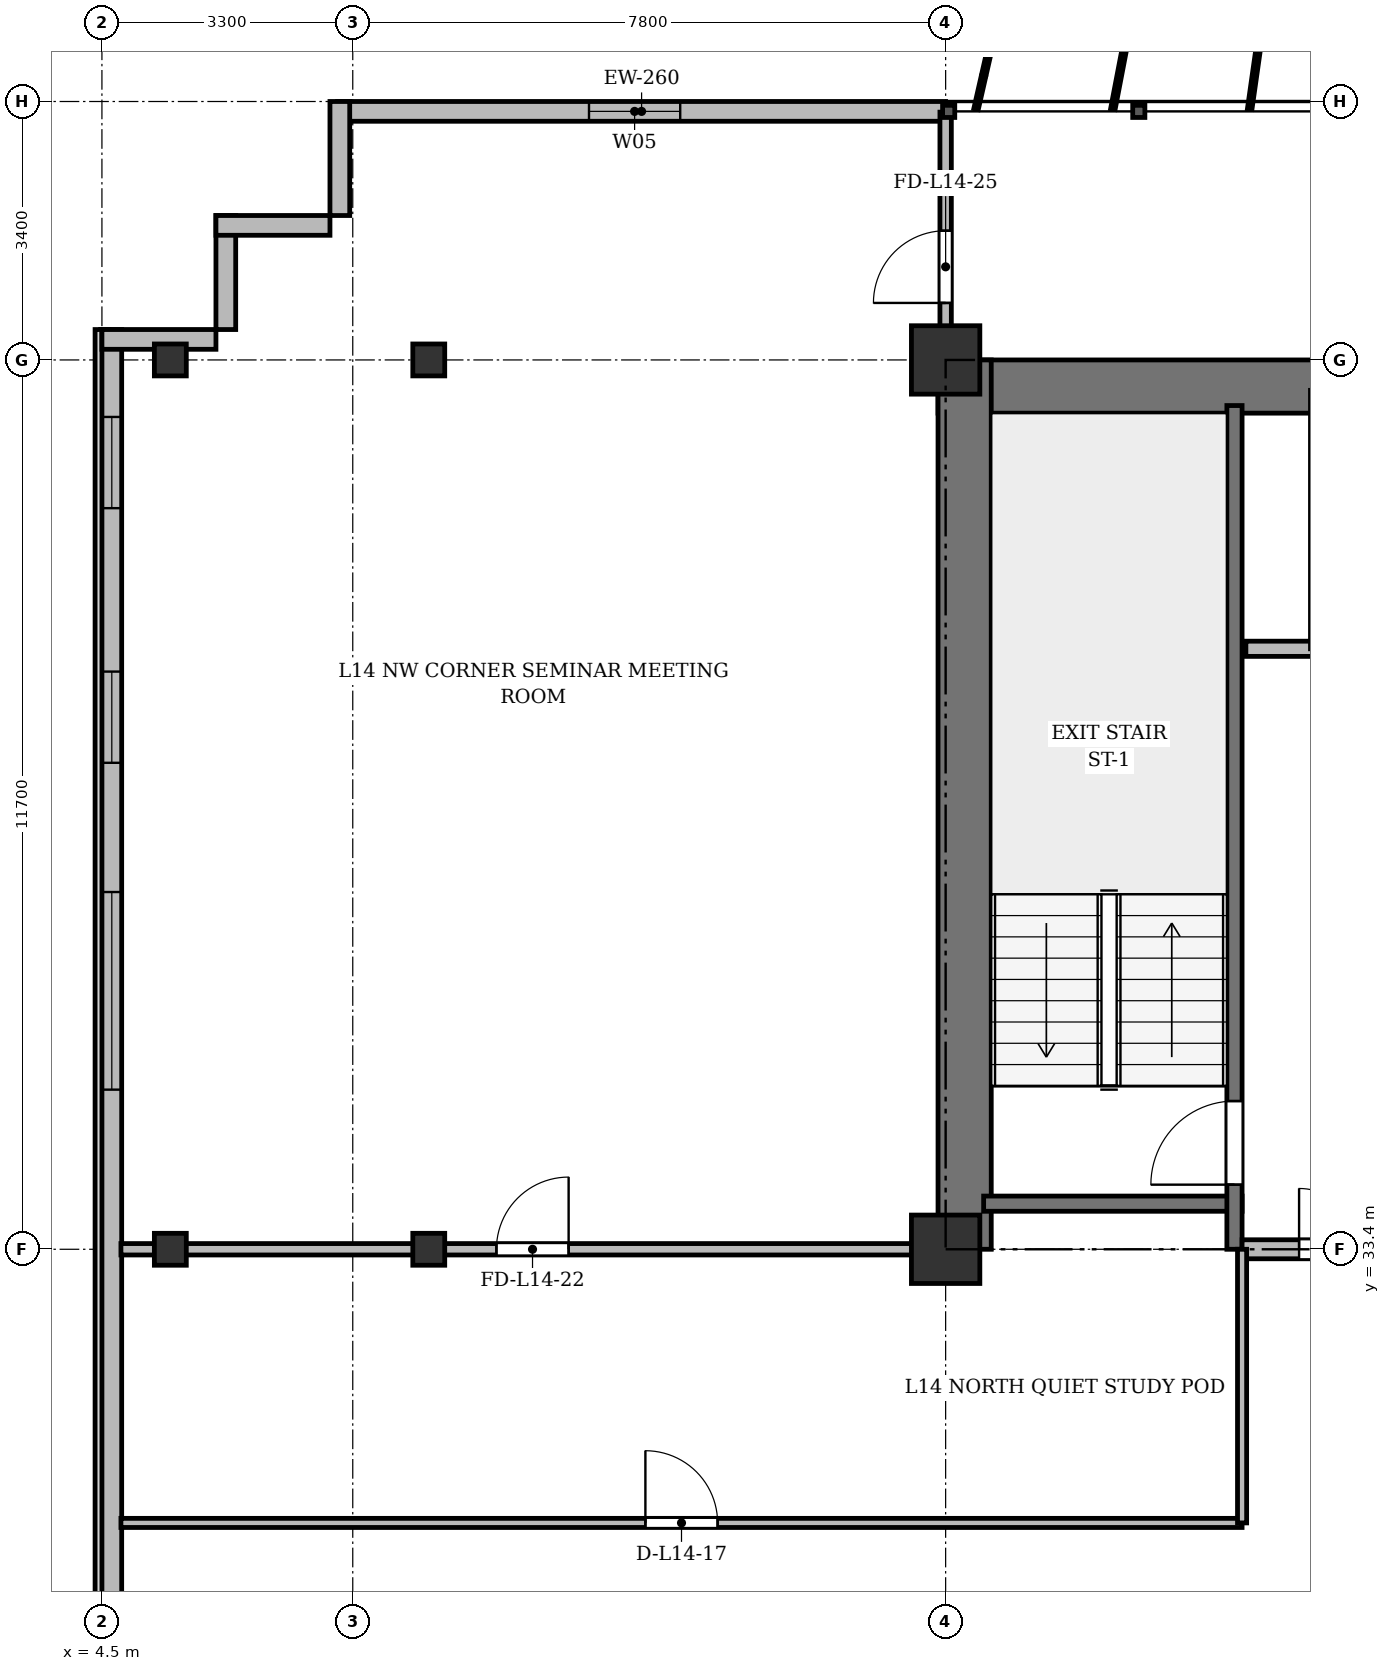
"""IFC4 building model, lengths in metres.
Left out: names, types, materials, properties, quantities, classifications, styles, units other than length and angle.
Written with IfcOpenShell. Run it as: python <this file> out.ifc"""

import sys

from ifc_helpers import new_model, si_unit, direction, frame, frame_2d, origin, origin_2d, place, context, subcontext, project, spatial, rectangle, i_section, extrude, source, transform, mapped, element, fill, save


model = new_model("IFC4")
c1 = context("Model", 3, precision=1e-05, world=origin(), true_north=direction((0.0, 1.0)))
c2 = subcontext(c1, "Body", "Model", "MODEL_VIEW")
j1 = project(units=[si_unit("LENGTHUNIT", "METRE"), si_unit("PLANEANGLEUNIT", "RADIAN")], contexts=[c1])
p1 = place(None, origin())
s1 = spatial("IfcSite", under=j1, at=p1, CompositionType="ELEMENT")
p2 = place(p1, origin())
s2 = spatial("IfcBuilding", under=s1, at=p2, CompositionType="ELEMENT")
p3 = place(p2, frame((0.0, 0.0, 55.9)))
s3 = spatial("IfcBuildingStorey", under=s2, at=p3, CompositionType="ELEMENT", Elevation=55.9)
m1 = source(origin(), c2, "Body", "SweptSolid", [
    extrude(i_section(OverallWidth=0.42, OverallDepth=0.42, WebThickness=0.026, FlangeThickness=0.04, at=origin_2d()), origin(), (0.0, 0.0, 1.0), 3.6),
])
for number, where, z_axis, x_axis in (
    (1, (5.4, 33.4, 0.0), (0.0, 0.0, 1.0), (1.0, 0.0, 0.0)),
    (2, (5.4, 45.1, 0.0), (0.0, 0.0, 1.0), (1.0, 0.0, 0.0)),
    (3, (8.8, 33.4, 0.0), (0.0, 0.0, 1.0), (1.0, 0.0, 0.0)),
    (4, (8.8, 45.1, 0.0), (0.0, 0.0, 1.0), (1.0, 0.0, 0.0)),
):
    element("IfcColumn", number, at=place(p3, frame(where, z_axis=z_axis, x_axis=x_axis)), inside=s3, PredefinedType="COLUMN", context=c2, shape_type="MappedRepresentation", body=[
        mapped(m1, transform((0.0, 0.0, 0.0), x_axis=(1.0, 0.0, 0.0), y_axis=(0.0, 1.0, 0.0), z_axis=(0.0, 0.0, 1.0), scale=1.0)),
    ])
m2 = source(origin(), c2, "Body", "SweptSolid", [
    extrude(rectangle(XDim=0.9, YDim=0.9, at=origin_2d()), origin(), (0.0, 0.0, 1.0), 3.6),
])
for number, where, z_axis, x_axis in (
    (5, (15.6, 33.4, 0.0), (0.0, 0.0, 1.0), (1.0, 0.0, 0.0)),
    (6, (15.6, 45.1, 0.0), (0.0, 0.0, 1.0), (1.0, 0.0, 0.0)),
):
    element("IfcColumn", number, at=place(p3, frame(where, z_axis=z_axis, x_axis=x_axis)), inside=s3, PredefinedType="COLUMN", context=c2, shape_type="MappedRepresentation", body=[
        mapped(m2, transform((0.0, 0.0, 0.0), x_axis=(1.0, 0.0, 0.0), y_axis=(0.0, 1.0, 0.0), z_axis=(0.0, 0.0, 1.0), scale=1.0)),
    ])
p4 = place(p3, frame((7.6, 48.37, 0.0), z_axis=(0.0, 0.0, 1.0), x_axis=(1.0, 0.0, 0.0)))
e7 = element("IfcWall", 7, at=p4, inside=s3, PredefinedType="SOLIDWALL", context=c2, shape_type="SweptSolid", body=[
    extrude(rectangle(XDim=8.0, YDim=0.26, at=frame_2d((4.0, 0.0))), origin(), (0.0, 0.0, 1.0), 3.34),
])
p5 = place(p4, frame((3.308, 0.0, 0.9)))
e8 = element("IfcOpeningElement", 8, at=p5, cuts=e7, PredefinedType="OPENING", context=c2, shape_type="SweptSolid", body=[
    extrude(rectangle(XDim=1.2, YDim=1.65, at=frame_2d((0.6, 0.825))), frame((0.0, 0.14, 0.0), z_axis=(0.0, -1.0, 0.0), x_axis=(1.0, 0.0, 0.0)), (0.0, 0.0, 1.0), 0.28),
])
p6 = place(p3, frame((4.63, 5.9, 0.0), z_axis=(0.0, 0.0, 1.0), x_axis=(0.0, 1.0, 0.0)))
e9 = element("IfcWall", 9, at=p6, inside=s3, PredefinedType="SOLIDWALL", context=c2, shape_type="SweptSolid", body=[
    extrude(rectangle(XDim=39.6, YDim=0.26, at=frame_2d((19.8, 0.0))), origin(), (0.0, 0.0, 1.0), 3.34),
])
p7 = place(p6, frame((1.45, 0.0, 0.92)))
e10 = element("IfcOpeningElement", 10, at=p7, cuts=e9, PredefinedType="OPENING", context=c2, shape_type="SweptSolid", body=[
    extrude(rectangle(XDim=1.2, YDim=1.65, at=frame_2d((0.6, 0.825))), frame((0.0, 0.14, 0.0), z_axis=(0.0, -1.0, 0.0), x_axis=(1.0, 0.0, 0.0)), (0.0, 0.0, 1.0), 0.28),
])
p8 = place(p6, frame((4.2, 0.0, 0.92)))
e11 = element("IfcOpeningElement", 11, at=p8, cuts=e9, PredefinedType="OPENING", context=c2, shape_type="SweptSolid", body=[
    extrude(rectangle(XDim=2.6, YDim=1.9, at=frame_2d((1.3, 0.95))), frame((0.0, 0.14, 0.0), z_axis=(0.0, -1.0, 0.0), x_axis=(1.0, 0.0, 0.0)), (0.0, 0.0, 1.0), 0.28),
])
p9 = place(p6, frame((8.4, 0.0, 0.92)))
e12 = element("IfcOpeningElement", 12, at=p9, cuts=e9, PredefinedType="OPENING", context=c2, shape_type="SweptSolid", body=[
    extrude(rectangle(XDim=2.6, YDim=1.9, at=frame_2d((1.3, 0.95))), frame((0.0, 0.14, 0.0), z_axis=(0.0, -1.0, 0.0), x_axis=(1.0, 0.0, 0.0)), (0.0, 0.0, 1.0), 0.28),
])
p10 = place(p6, frame((29.6, 0.0, 0.92)))
e13 = element("IfcOpeningElement", 13, at=p10, cuts=e9, PredefinedType="OPENING", context=c2, shape_type="SweptSolid", body=[
    extrude(rectangle(XDim=2.6, YDim=1.9, at=frame_2d((1.3, 0.95))), frame((0.0, 0.14, 0.0), z_axis=(0.0, -1.0, 0.0), x_axis=(1.0, 0.0, 0.0)), (0.0, 0.0, 1.0), 0.28),
])
p11 = place(p6, frame((33.9, 0.0, 0.92)))
e14 = element("IfcOpeningElement", 14, at=p11, cuts=e9, PredefinedType="OPENING", context=c2, shape_type="SweptSolid", body=[
    extrude(rectangle(XDim=1.2, YDim=1.65, at=frame_2d((0.6, 0.825))), frame((0.0, 0.14, 0.0), z_axis=(0.0, -1.0, 0.0), x_axis=(1.0, 0.0, 0.0)), (0.0, 0.0, 1.0), 0.28),
])
p12 = place(p6, frame((37.25, 0.0, 0.92)))
e15 = element("IfcOpeningElement", 15, at=p12, cuts=e9, PredefinedType="OPENING", context=c2, shape_type="SweptSolid", body=[
    extrude(rectangle(XDim=1.2, YDim=1.65, at=frame_2d((0.6, 0.825))), frame((0.0, 0.14, 0.0), z_axis=(0.0, -1.0, 0.0), x_axis=(1.0, 0.0, 0.0)), (0.0, 0.0, 1.0), 0.28),
])
p13 = place(p3, frame((4.5, 45.37, 0.0), z_axis=(0.0, 0.0, 1.0), x_axis=(1.0, 0.0, 0.0)))
e16 = element("IfcWall", 16, at=p13, inside=s3, PredefinedType="SOLIDWALL", context=c2, shape_type="SweptSolid", body=[
    extrude(rectangle(XDim=1.5, YDim=0.26, at=frame_2d((0.75, 0.0))), origin(), (0.0, 0.0, 1.0), 2.69),
])
for number, where, z_axis, x_axis in (
    (17, (6.13, 45.5, 0.0), (0.0, 0.0, 1.0), (0.0, 1.0, 0.0)),
    (18, (6.0, 46.87, 0.0), (0.0, 0.0, 1.0), (1.0, 0.0, 0.0)),
    (19, (7.63, 47.0, 0.0), (0.0, 0.0, 1.0), (0.0, 1.0, 0.0)),
):
    element("IfcWall", number, at=place(p3, frame(where, z_axis=z_axis, x_axis=x_axis)), inside=s3, PredefinedType="SOLIDWALL", context=c2, shape_type="SweptSolid", body=[
        extrude(rectangle(XDim=1.5, YDim=0.26, at=frame_2d((0.75, 0.0))), origin(), (0.0, 0.0, 1.0), 3.34),
    ])
p14 = place(p3, frame((15.5, 44.75, 0.0), z_axis=(0.0, 0.0, 1.0), x_axis=(1.0, 0.0, 0.0)))
e20 = element("IfcWall", 20, at=p14, inside=s3, PredefinedType="SHEAR", context=c2, shape_type="SweptSolid", body=[
    extrude(rectangle(XDim=43.4, YDim=0.7, at=frame_2d((21.7, 0.0))), origin(), (0.0, 0.0, 1.0), 3.34),
])
p15 = place(p3, frame((15.85, 33.4, 0.0), z_axis=(0.0, 0.0, 1.0), x_axis=(0.0, 1.0, 0.0)))
e21 = element("IfcWall", 21, at=p15, inside=s3, PredefinedType="SHEAR", context=c2, shape_type="SweptSolid", body=[
    extrude(rectangle(XDim=11.7, YDim=0.7, at=frame_2d((5.85, 0.0))), origin(), (0.0, 0.0, 1.0), 3.34),
])
p16 = place(p3, frame((16.1, 34.0, 0.0), z_axis=(0.0, 0.0, 1.0), x_axis=(1.0, 0.0, 0.0)))
e22 = element("IfcWall", 22, at=p16, inside=s3, PredefinedType="SHEAR", context=c2, shape_type="SweptSolid", body=[
    extrude(rectangle(XDim=3.4, YDim=0.2, at=frame_2d((1.7, 0.0))), origin(), (0.0, 0.0, 1.0), 3.34),
])
p17 = place(p3, frame((19.4, 33.4, 0.0), z_axis=(0.0, 0.0, 1.0), x_axis=(0.0, 1.0, 0.0)))
e23 = element("IfcWall", 23, at=p17, inside=s3, PredefinedType="SHEAR", context=c2, shape_type="SweptSolid", body=[
    extrude(rectangle(XDim=11.1, YDim=0.2, at=frame_2d((5.55, 0.0))), origin(), (0.0, 0.0, 1.0), 3.34),
])
p18 = place(p17, frame((0.85, 0.0, 0.0)))
e24 = element("IfcOpeningElement", 24, at=p18, cuts=e23, PredefinedType="OPENING", context=c2, shape_type="SweptSolid", body=[
    extrude(rectangle(XDim=1.1, YDim=2.15, at=frame_2d((0.55, 1.075))), frame((0.0, 0.11, 0.0), z_axis=(0.0, -1.0, 0.0), x_axis=(1.0, 0.0, 0.0)), (0.0, 0.0, 1.0), 0.22),
])
p19 = place(p3, frame((19.55, 41.3, 0.0), z_axis=(0.0, 0.0, 1.0), x_axis=(1.0, 0.0, 0.0)))
e25 = element("IfcWall", 25, at=p19, inside=s3, PredefinedType="SOLIDWALL", context=c2, shape_type="SweptSolid", body=[
    extrude(rectangle(XDim=6.75, YDim=0.2, at=frame_2d((3.375, 0.0))), origin(), (0.0, 0.0, 1.0), 3.34),
])
p20 = place(p19, frame((1.7, 0.0, 0.0)))
e26 = element("IfcOpeningElement", 26, at=p20, cuts=e25, PredefinedType="OPENING", context=c2, shape_type="SweptSolid", body=[
    extrude(rectangle(XDim=1.1, YDim=2.15, at=frame_2d((0.55, 1.075))), frame((0.0, 0.11, 0.0), z_axis=(0.0, -1.0, 0.0), x_axis=(1.0, 0.0, 0.0)), (0.0, 0.0, 1.0), 0.22),
])
p21 = place(p19, frame((4.4, 0.0, 0.0)))
e27 = element("IfcOpeningElement", 27, at=p21, cuts=e25, PredefinedType="OPENING", context=c2, shape_type="SweptSolid", body=[
    extrude(rectangle(XDim=1.1, YDim=2.15, at=frame_2d((0.55, 1.075))), frame((0.0, 0.11, 0.0), z_axis=(0.0, -1.0, 0.0), x_axis=(1.0, 0.0, 0.0)), (0.0, 0.0, 1.0), 0.22),
])
p22 = place(p3, frame((19.5, 33.4, 0.0), z_axis=(0.0, 0.0, 1.0), x_axis=(1.0, 0.0, 0.0)))
e28 = element("IfcWall", 28, at=p22, inside=s3, PredefinedType="PARTITIONING", context=c2, shape_type="SweptSolid", body=[
    extrude(rectangle(XDim=6.8, YDim=0.25, at=frame_2d((3.4, 0.0))), origin(), (0.0, 0.0, 1.0), 2.69),
])
p23 = place(p22, frame((0.75, 0.0, 0.0)))
e29 = element("IfcOpeningElement", 29, at=p23, cuts=e28, PredefinedType="OPENING", context=c2, shape_type="SweptSolid", body=[
    extrude(rectangle(XDim=1.6, YDim=2.2, at=frame_2d((0.8, 1.1))), frame((0.0, 0.135, 0.0), z_axis=(0.0, -1.0, 0.0), x_axis=(1.0, 0.0, 0.0)), (0.0, 0.0, 1.0), 0.27),
])
p24 = place(p3, frame((4.75, 29.8, 0.0), z_axis=(0.0, 0.0, 1.0), x_axis=(1.0, 0.0, 0.0)))
e30 = element("IfcWall", 30, at=p24, inside=s3, PredefinedType="PARTITIONING", context=c2, shape_type="SweptSolid", body=[
    extrude(rectangle(XDim=14.75, YDim=0.12, at=frame_2d((7.375, 0.0))), origin(), (0.0, 0.0, 1.0), 2.752),
])
p25 = place(p24, frame((6.9, 0.0, 0.0)))
e31 = element("IfcOpeningElement", 31, at=p25, cuts=e30, PredefinedType="OPENING", context=c2, shape_type="SweptSolid", body=[
    extrude(rectangle(XDim=0.95, YDim=2.15, at=frame_2d((0.475, 1.075))), frame((0.0, 0.07, 0.0), z_axis=(0.0, -1.0, 0.0), x_axis=(1.0, 0.0, 0.0)), (0.0, 0.0, 1.0), 0.14),
])
p26 = place(p3, frame((19.5, 29.8, 0.0), z_axis=(0.0, 0.0, 1.0), x_axis=(0.0, 1.0, 0.0)))
e32 = element("IfcWall", 32, at=p26, inside=s3, PredefinedType="PARTITIONING", context=c2, shape_type="SweptSolid", body=[
    extrude(rectangle(XDim=3.6, YDim=0.12, at=frame_2d((1.8, 0.0))), origin(), (0.0, 0.0, 1.0), 2.69),
])
p27 = place(p3, frame((4.75, 33.4, 0.0), z_axis=(0.0, 0.0, 1.0), x_axis=(1.0, 0.0, 0.0)))
e33 = element("IfcWall", 33, at=p27, inside=s3, PredefinedType="PARTITIONING", context=c2, shape_type="SweptSolid", body=[
    extrude(rectangle(XDim=10.85, YDim=0.15, at=frame_2d((5.425, 0.0))), origin(), (0.0, 0.0, 1.0), 2.69),
])
p28 = place(p27, frame((4.94, 0.0, 0.0)))
e34 = element("IfcOpeningElement", 34, at=p28, cuts=e33, PredefinedType="OPENING", context=c2, shape_type="SweptSolid", body=[
    extrude(rectangle(XDim=0.95, YDim=2.15, at=frame_2d((0.475, 1.075))), frame((0.0, 0.085, 0.0), z_axis=(0.0, -1.0, 0.0), x_axis=(1.0, 0.0, 0.0)), (0.0, 0.0, 1.0), 0.17),
])
p29 = place(p3, frame((15.6, 44.75, 0.0), z_axis=(0.0, 0.0, 1.0), x_axis=(0.0, 1.0, 0.0)))
e35 = element("IfcWall", 35, at=p29, inside=s3, PredefinedType="PARTITIONING", context=c2, shape_type="SweptSolid", body=[
    extrude(rectangle(XDim=3.61, YDim=0.15, at=frame_2d((1.805, 0.0))), origin(), (0.0, 0.0, 1.0), 2.752),
])
p30 = place(p29, frame((1.1, 0.0, 0.0)))
e36 = element("IfcOpeningElement", 36, at=p30, cuts=e35, PredefinedType="OPENING", context=c2, shape_type="SweptSolid", body=[
    extrude(rectangle(XDim=0.95, YDim=2.15, at=frame_2d((0.475, 1.075))), frame((0.0, 0.085, 0.0), z_axis=(0.0, -1.0, 0.0), x_axis=(1.0, 0.0, 0.0)), (0.0, 0.0, 1.0), 0.17),
])
m3 = source(origin(), c2, "Body", "SweptSolid", [
    extrude(rectangle(XDim=1.2, YDim=1.65, at=frame_2d((0.6, 0.825))), frame((0.0, 0.03, 0.0), z_axis=(0.0, -1.0, 0.0), x_axis=(1.0, 0.0, 0.0)), (0.0, 0.0, 1.0), 0.06),
])
p31 = place(p5, origin())
e37 = element("IfcWindow", 37, at=p31, inside=s3, PartitioningType="SINGLE_PANEL", PredefinedType="WINDOW", context=c2, shape_type="MappedRepresentation", body=[
    mapped(m3, transform((0.0, 0.0, 0.0), x_axis=(1.0, 0.0, 0.0), y_axis=(0.0, 1.0, 0.0), z_axis=(0.0, 0.0, 1.0), scale=1.0)),
])
fill(e8, e37)
m4 = source(origin(), c2, "Body", "SweptSolid", [
    extrude(rectangle(XDim=2.6, YDim=1.9, at=frame_2d((1.3, 0.95))), frame((0.0, 0.03, 0.0), z_axis=(0.0, -1.0, 0.0), x_axis=(1.0, 0.0, 0.0)), (0.0, 0.0, 1.0), 0.06),
])
p32 = place(p10, origin())
e38 = element("IfcWindow", 38, at=p32, inside=s3, PartitioningType="SINGLE_PANEL", PredefinedType="WINDOW", context=c2, shape_type="MappedRepresentation", body=[
    mapped(m4, transform((0.0, 0.0, 0.0), x_axis=(1.0, 0.0, 0.0), y_axis=(0.0, 1.0, 0.0), z_axis=(0.0, 0.0, 1.0), scale=1.0)),
])
fill(e13, e38)
p33 = place(p11, origin())
e39 = element("IfcWindow", 39, at=p33, inside=s3, PartitioningType="SINGLE_PANEL", PredefinedType="WINDOW", context=c2, shape_type="MappedRepresentation", body=[
    mapped(m3, transform((0.0, 0.0, 0.0), x_axis=(1.0, 0.0, 0.0), y_axis=(0.0, 1.0, 0.0), z_axis=(0.0, 0.0, 1.0), scale=1.0)),
])
fill(e14, e39)
p34 = place(p12, origin())
e40 = element("IfcWindow", 40, at=p34, inside=s3, PartitioningType="SINGLE_PANEL", PredefinedType="WINDOW", context=c2, shape_type="MappedRepresentation", body=[
    mapped(m3, transform((0.0, 0.0, 0.0), x_axis=(1.0, 0.0, 0.0), y_axis=(0.0, 1.0, 0.0), z_axis=(0.0, 0.0, 1.0), scale=1.0)),
])
fill(e15, e40)
m5 = source(origin(), c2, "Body", "SweptSolid", [
    extrude(rectangle(XDim=1.1, YDim=2.15, at=frame_2d((0.55, 1.075))), frame((0.0, 0.025, 0.0), z_axis=(0.0, -1.0, 0.0), x_axis=(1.0, 0.0, 0.0)), (0.0, 0.0, 1.0), 0.05),
])
p35 = place(p18, origin())
e41 = element("IfcDoor", 41, at=p35, inside=s3, OperationType="SINGLE_SWING_LEFT", PredefinedType="DOOR", context=c2, shape_type="MappedRepresentation", body=[
    mapped(m5, transform((0.0, 0.0, 0.0), x_axis=(1.0, 0.0, 0.0), y_axis=(0.0, 1.0, 0.0), z_axis=(0.0, 0.0, 1.0), scale=1.0)),
])
fill(e24, e41)
m6 = source(origin(), c2, "Body", "SweptSolid", [
    extrude(rectangle(XDim=1.6, YDim=2.2, at=frame_2d((0.8, 1.1))), frame((0.0, 0.025, 0.0), z_axis=(0.0, -1.0, 0.0), x_axis=(1.0, 0.0, 0.0)), (0.0, 0.0, 1.0), 0.05),
])
p36 = place(p23, origin())
e42 = element("IfcDoor", 42, at=p36, inside=s3, OperationType="DOUBLE_DOOR_SINGLE_SWING", PredefinedType="DOOR", context=c2, shape_type="MappedRepresentation", body=[
    mapped(m6, transform((0.0, 0.0, 0.0), x_axis=(1.0, 0.0, 0.0), y_axis=(0.0, 1.0, 0.0), z_axis=(0.0, 0.0, 1.0), scale=1.0)),
])
fill(e29, e42)
m7 = source(origin(), c2, "Body", "SweptSolid", [
    extrude(rectangle(XDim=0.95, YDim=2.15, at=frame_2d((0.475, 1.075))), frame((0.0, 0.025, 0.0), z_axis=(0.0, -1.0, 0.0), x_axis=(1.0, 0.0, 0.0)), (0.0, 0.0, 1.0), 0.05),
])
p37 = place(p25, origin())
e43 = element("IfcDoor", 43, at=p37, inside=s3, OperationType="SINGLE_SWING_LEFT", PredefinedType="DOOR", context=c2, shape_type="MappedRepresentation", body=[
    mapped(m7, transform((0.0, 0.0, 0.0), x_axis=(1.0, 0.0, 0.0), y_axis=(0.0, 1.0, 0.0), z_axis=(0.0, 0.0, 1.0), scale=1.0)),
])
fill(e31, e43)
p38 = place(p28, origin())
e44 = element("IfcDoor", 44, at=p38, inside=s3, OperationType="SINGLE_SWING_RIGHT", PredefinedType="DOOR", context=c2, shape_type="MappedRepresentation", body=[
    mapped(m7, transform((0.0, 0.0, 0.0), x_axis=(1.0, 0.0, 0.0), y_axis=(0.0, 1.0, 0.0), z_axis=(0.0, 0.0, 1.0), scale=1.0)),
])
fill(e34, e44)
p39 = place(p30, origin())
e45 = element("IfcDoor", 45, at=p39, inside=s3, OperationType="SINGLE_SWING_LEFT", PredefinedType="DOOR", context=c2, shape_type="MappedRepresentation", body=[
    mapped(m7, transform((0.0, 0.0, 0.0), x_axis=(1.0, 0.0, 0.0), y_axis=(0.0, 1.0, 0.0), z_axis=(0.0, 0.0, 1.0), scale=1.0)),
])
fill(e36, e45)
save(model, sys.argv[1])
